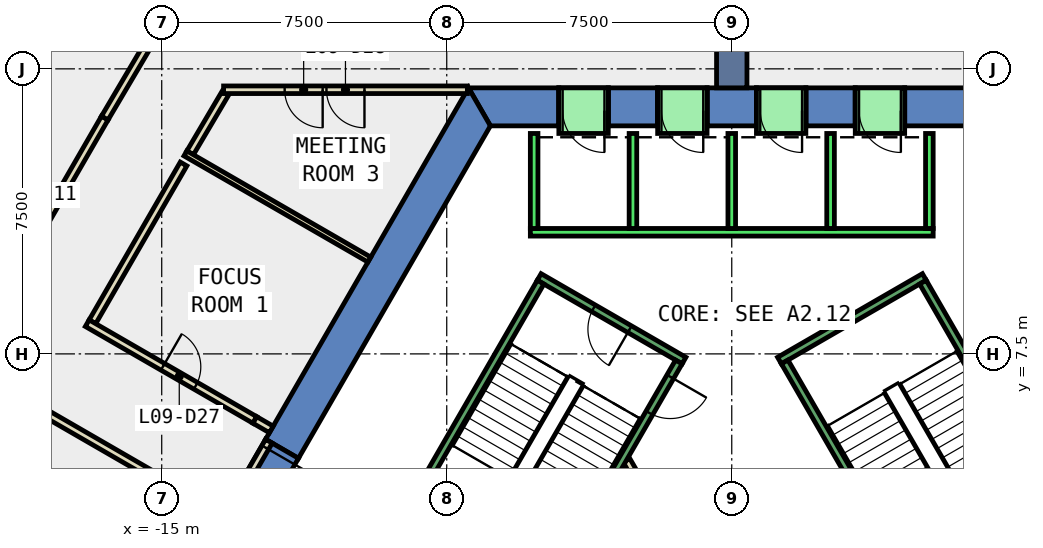
"""IFC4 building model, lengths in metres.
Left out: names, types, materials, properties, quantities, classifications, styles, units other than length and angle.
Written with IfcOpenShell. Run it as: python <this file> out.ifc"""

import sys

from ifc_helpers import new_model, si_unit, direction, frame, frame_2d, origin, place, context, subcontext, project, spatial, polyline, rectangle, outline, extrude, element, fill, save


model = new_model("IFC4")
c1 = context("Model", 3, precision=1e-05, world=origin(), true_north=direction((0.0, 1.0)))
c2 = subcontext(c1, "Body", "Model", "MODEL_VIEW")
j1 = project(units=[si_unit("LENGTHUNIT", "METRE"), si_unit("PLANEANGLEUNIT", "RADIAN")], contexts=[c1])
p1 = place(None, origin())
s1 = spatial("IfcSite", under=j1, at=p1, CompositionType="ELEMENT")
p2 = place(p1, origin())
s2 = spatial("IfcBuilding", under=s1, at=p2, CompositionType="ELEMENT")
p3 = place(p2, frame((0.0, 0.0, 47.6)))
s3 = spatial("IfcBuildingStorey", under=s2, at=p3, CompositionType="ELEMENT", Elevation=47.6)
p4 = place(p3, frame((0.0, 0.0, -0.4)))
e1 = element("IfcWall", 1, at=p4, inside=s3, PredefinedType="SHEAR", context=c2, shape_type="SweptSolid", body=[
    extrude(outline(polyline([(4.55, 14.5), (4.55, 13.5), (6.351, 13.5), (6.928, 14.5), (4.55, 14.5)])), origin(), (0.0, 0.0, 1.0), 4.2),
])
p5 = place(p3, frame((0.0, 0.0, -0.4)))
e2 = element("IfcWall", 2, at=p5, inside=s3, PredefinedType="SHEAR", context=c2, shape_type="SweptSolid", body=[
    extrude(outline(polyline([(1.95, 14.5), (1.95, 13.5), (3.25, 13.5), (3.25, 14.5), (1.95, 14.5)])), origin(), (0.0, 0.0, 1.0), 4.2),
])
p6 = place(p3, frame((0.0, 0.0, -0.4)))
e3 = element("IfcWall", 3, at=p6, inside=s3, PredefinedType="SHEAR", context=c2, shape_type="SweptSolid", body=[
    extrude(outline(polyline([(-0.65, 14.5), (-0.65, 13.5), (0.65, 13.5), (0.65, 14.5), (-0.65, 14.5)])), origin(), (0.0, 0.0, 1.0), 4.2),
])
p7 = place(p3, frame((0.0, 0.0, -0.4)))
e4 = element("IfcWall", 4, at=p7, inside=s3, PredefinedType="SHEAR", context=c2, shape_type="SweptSolid", body=[
    extrude(outline(polyline([(-3.25, 14.5), (-3.25, 13.5), (-1.95, 13.5), (-1.95, 14.5), (-3.25, 14.5)])), origin(), (0.0, 0.0, 1.0), 4.2),
])
p8 = place(p3, frame((0.0, 0.0, -0.4)))
e5 = element("IfcWall", 5, at=p8, inside=s3, PredefinedType="SHEAR", context=c2, shape_type="SweptSolid", body=[
    extrude(outline(polyline([(-4.55, 13.5), (-4.55, 14.5), (-6.928, 14.5), (-6.351, 13.5), (-4.55, 13.5)])), origin(), (0.0, 0.0, 1.0), 4.2),
])
p9 = place(p3, frame((0.0, 0.0, 3.6)))
e6 = element("IfcWall", 6, at=p9, inside=s3, PredefinedType="SHEAR", context=c2, shape_type="SweptSolid", body=[
    extrude(outline(polyline([(3.25, 14.5), (3.25, 13.5), (4.55, 13.5), (4.55, 14.5), (3.25, 14.5)])), origin(), (0.0, 0.0, 1.0), 0.2),
])
p10 = place(p3, frame((0.0, 0.0, 3.6)))
e7 = element("IfcWall", 7, at=p10, inside=s3, PredefinedType="SHEAR", context=c2, shape_type="SweptSolid", body=[
    extrude(outline(polyline([(0.65, 14.5), (0.65, 13.5), (1.95, 13.5), (1.95, 14.5), (0.65, 14.5)])), origin(), (0.0, 0.0, 1.0), 0.2),
])
p11 = place(p3, frame((0.0, 0.0, 3.6)))
e8 = element("IfcWall", 8, at=p11, inside=s3, PredefinedType="SHEAR", context=c2, shape_type="SweptSolid", body=[
    extrude(outline(polyline([(-1.95, 14.5), (-1.95, 13.5), (-0.65, 13.5), (-0.65, 14.5), (-1.95, 14.5)])), origin(), (0.0, 0.0, 1.0), 0.2),
])
p12 = place(p3, frame((0.0, 0.0, 3.6)))
e9 = element("IfcWall", 9, at=p12, inside=s3, PredefinedType="SHEAR", context=c2, shape_type="SweptSolid", body=[
    extrude(outline(polyline([(-4.55, 14.5), (-4.55, 13.5), (-3.25, 13.5), (-3.25, 14.5), (-4.55, 14.5)])), origin(), (0.0, 0.0, 1.0), 0.2),
])
p13 = place(p3, frame((0.0, 0.0, -0.4)))
e10 = element("IfcWall", 10, at=p13, inside=s3, PredefinedType="SHEAR", context=c2, shape_type="SweptSolid", body=[
    extrude(outline(polyline([(-12.267, 5.252), (-11.402, 4.752), (-6.351, 13.5), (-6.928, 14.5), (-12.267, 5.252)])), origin(), (0.0, 0.0, 1.0), 4.2),
])
p14 = place(p3, frame((0.0, 0.0, 3.6)))
e11 = element("IfcWall", 11, at=p14, inside=s3, PredefinedType="SHEAR", context=c2, shape_type="SweptSolid", body=[
    extrude(outline(polyline([(-13.267, 3.52), (-12.402, 3.02), (-11.402, 4.752), (-12.267, 5.252), (-13.267, 3.52)])), origin(), (0.0, 0.0, 1.0), 0.2),
])
p15 = place(p3, frame((0.0, 14.5, -0.4), z_axis=(0.0, 0.0, 1.0), x_axis=(0.0, 1.0, 0.0)))
e12 = element("IfcWall", 12, at=p15, inside=s3, PredefinedType="SHEAR", context=c2, shape_type="SweptSolid", body=[
    extrude(rectangle(XDim=9.0, YDim=0.8, at=frame_2d((4.5, 0.0))), origin(), (0.0, 0.0, 1.0), 4.2),
])
p16 = place(p3, frame((-14.425, 12.497, 0.0), z_axis=(0.0, 0.0, 1.0), x_axis=(-0.500026519606, -0.866010092142, 0.0)))
e13 = element("IfcWall", 13, at=p16, inside=s3, PredefinedType="PARTITIONING", context=c2, shape_type="SweptSolid", body=[
    extrude(rectangle(XDim=4.796, YDim=0.2, at=frame_2d((2.398, 0.0))), origin(), (0.0, 0.0, 1.0), 3.8),
])
p17 = place(p3, frame((-16.96, 8.308, 0.0), z_axis=(0.0, 0.0, 1.0), x_axis=(0.866018717003, -0.500011581666, 0.0)))
e14 = element("IfcWall", 14, at=p17, inside=s3, PredefinedType="PARTITIONING", context=c2, shape_type="SweptSolid", body=[
    extrude(rectangle(XDim=5.092, YDim=0.2, at=frame_2d((2.546, 0.0))), origin(), (0.0, 0.0, 1.0), 3.8),
])
p18 = place(p17, frame((2.296, 0.0, 0.0)))
e15 = element("IfcOpeningElement", 15, at=p18, cuts=e14, PredefinedType="OPENING", context=c2, shape_type="SweptSolid", body=[
    extrude(rectangle(XDim=1.0, YDim=2.1, at=frame_2d((0.5, 1.05))), frame((0.0, 0.11, 0.0), z_axis=(0.0, -1.0, 0.0), x_axis=(1.0, 0.0, 0.0)), (0.0, 0.0, 1.0), 0.22),
])
p19 = place(p3, frame((-13.323, 14.364, 0.0), z_axis=(0.0, 0.0, 1.0), x_axis=(-0.508274698505, -0.861195001646, 0.0)))
e16 = element("IfcWall", 16, at=p19, inside=s3, PredefinedType="PARTITIONING", context=c2, shape_type="SweptSolid", body=[
    extrude(rectangle(XDim=1.828, YDim=0.2, at=frame_2d((0.914, 0.0))), origin(), (0.0, 0.0, 1.0), 3.8),
])
p20 = place(p3, frame((-20.12, 7.434, 0.0), z_axis=(0.0, 0.0, 1.0), x_axis=(0.500039488902, 0.866002603656, 0.0)))
e17 = element("IfcWall", 17, at=p20, inside=s3, PredefinedType="PARTITIONING", context=c2, shape_type="SweptSolid", body=[
    extrude(rectangle(XDim=7.244, YDim=0.2, at=frame_2d((3.622, 0.0))), origin(), (0.0, 0.0, 1.0), 3.8),
])
p21 = place(p20, frame((3.122, 0.0, 0.0)))
e18 = element("IfcOpeningElement", 18, at=p21, cuts=e17, PredefinedType="OPENING", context=c2, shape_type="SweptSolid", body=[
    extrude(rectangle(XDim=1.0, YDim=2.1, at=frame_2d((0.5, 1.05))), frame((0.0, 0.11, 0.0), z_axis=(0.0, -1.0, 0.0), x_axis=(1.0, 0.0, 0.0)), (0.0, 0.0, 1.0), 0.22),
])
p22 = place(p3, frame((-16.498, 13.707, 0.0), z_axis=(0.0, 0.0, 1.0), x_axis=(0.508471945541, 0.861078556578, 0.0)))
e19 = element("IfcWall", 19, at=p22, inside=s3, PredefinedType="PARTITIONING", context=c2, shape_type="SweptSolid", body=[
    extrude(rectangle(XDim=3.548, YDim=0.2, at=frame_2d((1.774, 0.0))), origin(), (0.0, 0.0, 1.0), 3.8),
])
p23 = place(p3, frame((-14.377, 12.775, 0.0), z_axis=(0.0, 0.0, 1.0), x_axis=(0.866051730117, -0.499954398681, 0.0)))
e20 = element("IfcWall", 20, at=p23, inside=s3, PredefinedType="PARTITIONING", context=c2, shape_type="SweptSolid", body=[
    extrude(rectangle(XDim=5.588, YDim=0.15, at=frame_2d((2.794, 0.0))), origin(), (0.0, 0.0, 1.0), 3.8),
])
p24 = place(p3, frame((-6.957, 14.45, 0.0), z_axis=(0.0, 0.0, 1.0), x_axis=(-1.0, 0.0, 0.0)))
e21 = element("IfcWall", 21, at=p24, inside=s3, PredefinedType="PARTITIONING", context=c2, shape_type="SweptSolid", body=[
    extrude(rectangle(XDim=6.415, YDim=0.2, at=frame_2d((3.208, 0.0))), origin(), (0.0, 0.0, 1.0), 3.8),
])
p25 = place(p24, frame((2.708, 0.0, 0.0)))
e22 = element("IfcOpeningElement", 22, at=p25, cuts=e21, PredefinedType="OPENING", context=c2, shape_type="SweptSolid", body=[
    extrude(rectangle(XDim=1.0, YDim=2.1, at=frame_2d((0.5, 1.05))), frame((0.0, 0.11, 0.0), z_axis=(0.0, -1.0, 0.0), x_axis=(1.0, 0.0, 0.0)), (0.0, 0.0, 1.0), 0.22),
])
p26 = place(p24, frame((3.808, 0.0, 0.0)))
e23 = element("IfcOpeningElement", 23, at=p26, cuts=e21, PredefinedType="OPENING", context=c2, shape_type="SweptSolid", body=[
    extrude(rectangle(XDim=1.0, YDim=2.1, at=frame_2d((0.5, 1.05))), frame((0.0, 0.11, 0.0), z_axis=(0.0, -1.0, 0.0), x_axis=(1.0, 0.0, 0.0)), (0.0, 0.0, 1.0), 0.22),
])
p27 = place(p3, frame((-2.771, 4.7, 0.0), z_axis=(0.0, 0.0, 1.0), x_axis=(0.499969479948, -0.866043023828, 0.0)))
e24 = element("IfcWall", 24, at=p27, inside=s3, PredefinedType="PARTITIONING", context=c2, shape_type="SweptSolid", body=[
    extrude(rectangle(XDim=4.99, YDim=0.2, at=frame_2d((2.495, 0.0))), origin(), (0.0, 0.0, 1.0), 3.8),
])
p28 = place(p27, frame((1.945, 0.0, 0.0)))
e25 = element("IfcOpeningElement", 25, at=p28, cuts=e24, PredefinedType="OPENING", context=c2, shape_type="SweptSolid", body=[
    extrude(rectangle(XDim=1.0, YDim=2.1, at=frame_2d((0.5, 1.05))), frame((0.0, 0.11, 0.0), z_axis=(0.0, -1.0, 0.0), x_axis=(1.0, 0.0, 0.0)), (0.0, 0.0, 1.0), 0.22),
])
p29 = place(p3, frame((-12.18, 5.202, 0.0), z_axis=(0.0, 0.0, 1.0), x_axis=(-0.50002537861, -0.866010750942, 0.0)))
e26 = element("IfcWall", 26, at=p29, inside=s3, PredefinedType="PARTITIONING", context=c2, shape_type="SweptSolid", body=[
    extrude(rectangle(XDim=2.0, YDim=0.2, at=frame_2d((1.0, 0.0))), origin(), (0.0, 0.0, 1.0), 2.4),
])
p30 = place(p29, frame((0.19, 0.0, 0.0)))
e27 = element("IfcOpeningElement", 27, at=p30, cuts=e26, PredefinedType="OPENING", context=c2, shape_type="SweptSolid", body=[
    extrude(rectangle(XDim=1.8, YDim=2.1, at=frame_2d((0.9, 1.05))), frame((0.0, 0.11, 0.0), z_axis=(0.0, -1.0, 0.0), x_axis=(1.0, 0.0, 0.0)), (0.0, 0.0, 1.0), 0.22),
])
p31 = place(p3, frame((-12.55, 5.762, 0.0), z_axis=(0.0, 0.0, 1.0), x_axis=(0.866071776036, -0.499919672301, 0.0)))
e28 = element("IfcWall", 28, at=p31, inside=s3, PredefinedType="PARTITIONING", context=c2, shape_type="SweptSolid", body=[
    extrude(rectangle(XDim=0.5, YDim=0.2, at=frame_2d((0.25, 0.0))), origin(), (0.0, 0.0, 1.0), 2.4),
])
p32 = place(p3, frame((-13.85, 3.51, 0.0), z_axis=(0.0, 0.0, 1.0), x_axis=(-0.865969361037, 0.500097056325, 0.0)))
e29 = element("IfcWall", 29, at=p32, inside=s3, PredefinedType="PARTITIONING", context=c2, shape_type="SweptSolid", body=[
    extrude(rectangle(XDim=4.889, YDim=0.2, at=frame_2d((2.445, 0.0))), origin(), (0.0, 0.0, 1.0), 3.8),
])
p33 = place(p3, frame((5.3, 10.7, 0.0), z_axis=(0.0, 0.0, 1.0), x_axis=(-1.0, 0.0, 0.0)))
e30 = element("IfcWall", 30, at=p33, inside=s3, PredefinedType="STANDARD", context=c2, shape_type="SweptSolid", body=[
    extrude(rectangle(XDim=10.6, YDim=0.2, at=frame_2d((5.3, 0.0))), origin(), (0.0, 0.0, 1.0), 3.8),
])
for number, where, z_axis, x_axis in (
    (31, (5.2, 10.8, 0.0), (0.0, 0.0, 1.0), (0.0, 1.0, 0.0)),
    (32, (2.6, 10.8, 0.0), (0.0, 0.0, 1.0), (0.0, 1.0, 0.0)),
    (33, (0.0, 10.8, 0.0), (0.0, 0.0, 1.0), (0.0, 1.0, 0.0)),
    (34, (-2.6, 10.8, 0.0), (0.0, 0.0, 1.0), (0.0, 1.0, 0.0)),
    (35, (-5.2, 10.8, 0.0), (0.0, 0.0, 1.0), (0.0, 1.0, 0.0)),
):
    element("IfcWall", number, at=place(p3, frame(where, z_axis=z_axis, x_axis=x_axis)), inside=s3, PredefinedType="STANDARD", context=c2, shape_type="SweptSolid", body=[
        extrude(rectangle(XDim=2.5, YDim=0.2, at=frame_2d((1.25, 0.0))), origin(), (0.0, 0.0, 1.0), 3.8),
    ])
p34 = place(p3, frame((4.55, 13.9, 0.0), z_axis=(0.0, 0.0, 1.0), x_axis=(-1.0, 0.0, 0.0)))
e36 = element("IfcWall", 36, at=p34, inside=s3, PredefinedType="STANDARD", context=c2, shape_type="SweptSolid", body=[
    extrude(rectangle(XDim=1.3, YDim=1.2, at=frame_2d((0.65, 0.0))), origin(), (0.0, 0.0, 1.0), 2.4),
])
p35 = place(p34, frame((0.1, 0.0, 0.0)))
e37 = element("IfcOpeningElement", 37, at=p35, cuts=e36, PredefinedType="OPENING", context=c2, shape_type="SweptSolid", body=[
    extrude(rectangle(XDim=1.1, YDim=2.3, at=frame_2d((0.55, 1.15))), frame((0.0, 0.61, 0.0), z_axis=(0.0, -1.0, 0.0), x_axis=(1.0, 0.0, 0.0)), (0.0, 0.0, 1.0), 1.22),
])
p36 = place(p3, frame((1.95, 13.9, 0.0), z_axis=(0.0, 0.0, 1.0), x_axis=(-1.0, 0.0, 0.0)))
e38 = element("IfcWall", 38, at=p36, inside=s3, PredefinedType="STANDARD", context=c2, shape_type="SweptSolid", body=[
    extrude(rectangle(XDim=1.3, YDim=1.2, at=frame_2d((0.65, 0.0))), origin(), (0.0, 0.0, 1.0), 2.4),
])
p37 = place(p36, frame((0.1, 0.0, 0.0)))
e39 = element("IfcOpeningElement", 39, at=p37, cuts=e38, PredefinedType="OPENING", context=c2, shape_type="SweptSolid", body=[
    extrude(rectangle(XDim=1.1, YDim=2.3, at=frame_2d((0.55, 1.15))), frame((0.0, 0.61, 0.0), z_axis=(0.0, -1.0, 0.0), x_axis=(1.0, 0.0, 0.0)), (0.0, 0.0, 1.0), 1.22),
])
p38 = place(p3, frame((-0.65, 13.9, 0.0), z_axis=(0.0, 0.0, 1.0), x_axis=(-1.0, 0.0, 0.0)))
e40 = element("IfcWall", 40, at=p38, inside=s3, PredefinedType="STANDARD", context=c2, shape_type="SweptSolid", body=[
    extrude(rectangle(XDim=1.3, YDim=1.2, at=frame_2d((0.65, 0.0))), origin(), (0.0, 0.0, 1.0), 2.4),
])
p39 = place(p38, frame((0.1, 0.0, 0.0)))
e41 = element("IfcOpeningElement", 41, at=p39, cuts=e40, PredefinedType="OPENING", context=c2, shape_type="SweptSolid", body=[
    extrude(rectangle(XDim=1.1, YDim=2.3, at=frame_2d((0.55, 1.15))), frame((0.0, 0.61, 0.0), z_axis=(0.0, -1.0, 0.0), x_axis=(1.0, 0.0, 0.0)), (0.0, 0.0, 1.0), 1.22),
])
p40 = place(p3, frame((-3.25, 13.9, 0.0), z_axis=(0.0, 0.0, 1.0), x_axis=(-1.0, 0.0, 0.0)))
e42 = element("IfcWall", 42, at=p40, inside=s3, PredefinedType="STANDARD", context=c2, shape_type="SweptSolid", body=[
    extrude(rectangle(XDim=1.3, YDim=1.2, at=frame_2d((0.65, 0.0))), origin(), (0.0, 0.0, 1.0), 2.4),
])
p41 = place(p40, frame((0.1, 0.0, 0.0)))
e43 = element("IfcOpeningElement", 43, at=p41, cuts=e42, PredefinedType="OPENING", context=c2, shape_type="SweptSolid", body=[
    extrude(rectangle(XDim=1.1, YDim=2.3, at=frame_2d((0.55, 1.15))), frame((0.0, 0.61, 0.0), z_axis=(0.0, -1.0, 0.0), x_axis=(1.0, 0.0, 0.0)), (0.0, 0.0, 1.0), 1.22),
])
p42 = place(p3, frame((1.256, 7.324, 0.0), z_axis=(0.0, 0.0, 1.0), x_axis=(0.866046073146, 0.499964197906, 0.0)))
e44 = element("IfcWall", 44, at=p42, inside=s3, PredefinedType="STANDARD", context=c2, shape_type="SweptSolid", body=[
    extrude(rectangle(XDim=4.4, YDim=0.2, at=frame_2d((2.2, 0.0))), origin(), (0.0, 0.0, 1.0), 3.8),
])
p43 = place(p3, frame((4.843, 1.312, 0.0), z_axis=(0.0, 0.0, 1.0), x_axis=(-0.499963383562, 0.866046543262, 0.0)))
e45 = element("IfcWall", 45, at=p43, inside=s3, PredefinedType="STANDARD", context=c2, shape_type="SweptSolid", body=[
    extrude(rectangle(XDim=6.9, YDim=0.2, at=frame_2d((3.45, 0.0))), origin(), (0.0, 0.0, 1.0), 3.8),
])
p44 = place(p43, frame((0.45, 0.0, 0.0)))
e46 = element("IfcOpeningElement", 46, at=p44, cuts=e45, PredefinedType="OPENING", context=c2, shape_type="SweptSolid", body=[
    extrude(rectangle(XDim=1.1, YDim=2.2, at=frame_2d((0.55, 1.1))), frame((0.0, 0.11, 0.0), z_axis=(0.0, -1.0, 0.0), x_axis=(1.0, 0.0, 0.0)), (0.0, 0.0, 1.0), 0.22),
])
p45 = place(p3, frame((8.48, 3.412, 0.0), z_axis=(0.0, 0.0, 1.0), x_axis=(-0.499978703459, 0.866037698999, 0.0)))
e47 = element("IfcWall", 47, at=p45, inside=s3, PredefinedType="STANDARD", context=c2, shape_type="SweptSolid", body=[
    extrude(rectangle(XDim=6.9, YDim=0.2, at=frame_2d((3.45, 0.0))), origin(), (0.0, 0.0, 1.0), 3.8),
])
p46 = place(p3, frame((-1.256, 7.324, 0.0), z_axis=(0.0, 0.0, 1.0), x_axis=(-0.866046073146, 0.499964197906, 0.0)))
e48 = element("IfcWall", 48, at=p46, inside=s3, PredefinedType="STANDARD", context=c2, shape_type="SweptSolid", body=[
    extrude(rectangle(XDim=4.4, YDim=0.2, at=frame_2d((2.2, 0.0))), origin(), (0.0, 0.0, 1.0), 3.8),
])
p47 = place(p46, frame((1.65, 0.0, 0.0)))
e49 = element("IfcOpeningElement", 49, at=p47, cuts=e48, PredefinedType="OPENING", context=c2, shape_type="SweptSolid", body=[
    extrude(rectangle(XDim=1.1, YDim=2.2, at=frame_2d((0.55, 1.1))), frame((0.0, 0.11, 0.0), z_axis=(0.0, -1.0, 0.0), x_axis=(1.0, 0.0, 0.0)), (0.0, 0.0, 1.0), 0.22),
])
p48 = place(p3, frame((-1.393, 7.288, 0.0), z_axis=(0.0, 0.0, 1.0), x_axis=(-0.499963383562, -0.866046543262, 0.0)))
e50 = element("IfcWall", 50, at=p48, inside=s3, PredefinedType="STANDARD", context=c2, shape_type="SweptSolid", body=[
    extrude(rectangle(XDim=6.9, YDim=0.2, at=frame_2d((3.45, 0.0))), origin(), (0.0, 0.0, 1.0), 3.8),
])
p49 = place(p48, frame((0.45, 0.0, 0.0)))
e51 = element("IfcOpeningElement", 51, at=p49, cuts=e50, PredefinedType="OPENING", context=c2, shape_type="SweptSolid", body=[
    extrude(rectangle(XDim=1.1, YDim=2.2, at=frame_2d((0.55, 1.1))), frame((0.0, 0.11, 0.0), z_axis=(0.0, -1.0, 0.0), x_axis=(1.0, 0.0, 0.0)), (0.0, 0.0, 1.0), 0.22),
])
p50 = place(p3, frame((-5.03, 9.388, 0.0), z_axis=(0.0, 0.0, 1.0), x_axis=(-0.499978703459, -0.866037698999, 0.0)))
e52 = element("IfcWall", 52, at=p50, inside=s3, PredefinedType="STANDARD", context=c2, shape_type="SweptSolid", body=[
    extrude(rectangle(XDim=6.9, YDim=0.2, at=frame_2d((3.45, 0.0))), origin(), (0.0, 0.0, 1.0), 3.8),
])
p51 = place(p18, origin())
e53 = element("IfcDoor", 53, at=p51, inside=s3, OperationType="SINGLE_SWING_LEFT", PredefinedType="DOOR", context=c2, shape_type="SweptSolid", body=[
    extrude(rectangle(XDim=1.0, YDim=2.1, at=frame_2d((0.5, 1.05))), frame((0.0, 0.025, 0.0), z_axis=(0.0, -1.0, 0.0), x_axis=(1.0, 0.0, 0.0)), (0.0, 0.0, 1.0), 0.05),
])
fill(e15, e53)
p52 = place(p25, origin())
e54 = element("IfcDoor", 54, at=p52, inside=s3, OperationType="SINGLE_SWING_LEFT", PredefinedType="DOOR", context=c2, shape_type="SweptSolid", body=[
    extrude(rectangle(XDim=1.0, YDim=2.1, at=frame_2d((0.5, 1.05))), frame((0.0, 0.025, 0.0), z_axis=(0.0, -1.0, 0.0), x_axis=(1.0, 0.0, 0.0)), (0.0, 0.0, 1.0), 0.05),
])
fill(e22, e54)
p53 = place(p26, origin())
e55 = element("IfcDoor", 55, at=p53, inside=s3, OperationType="SINGLE_SWING_RIGHT", PredefinedType="DOOR", context=c2, shape_type="SweptSolid", body=[
    extrude(rectangle(XDim=1.0, YDim=2.1, at=frame_2d((0.5, 1.05))), frame((0.0, 0.025, 0.0), z_axis=(0.0, -1.0, 0.0), x_axis=(1.0, 0.0, 0.0)), (0.0, 0.0, 1.0), 0.05),
])
fill(e23, e55)
p54 = place(p30, origin())
e56 = element("IfcDoor", 56, at=p54, inside=s3, OperationType="DOUBLE_DOOR_SINGLE_SWING", PredefinedType="DOOR", context=c2, shape_type="SweptSolid", body=[
    extrude(rectangle(XDim=1.8, YDim=2.1, at=frame_2d((0.9, 1.05))), frame((0.0, 0.025, 0.0), z_axis=(0.0, -1.0, 0.0), x_axis=(1.0, 0.0, 0.0)), (0.0, 0.0, 1.0), 0.05),
])
fill(e27, e56)
p55 = place(p35, origin())
e57 = element("IfcDoor", 57, at=p55, inside=s3, OperationType="SLIDING_TO_LEFT", PredefinedType="DOOR", context=c2, shape_type="SweptSolid", body=[
    extrude(rectangle(XDim=1.1, YDim=2.3, at=frame_2d((0.55, 1.15))), frame((0.0, 0.025, 0.0), z_axis=(0.0, -1.0, 0.0), x_axis=(1.0, 0.0, 0.0)), (0.0, 0.0, 1.0), 0.05),
])
fill(e37, e57)
p56 = place(p37, origin())
e58 = element("IfcDoor", 58, at=p56, inside=s3, OperationType="SLIDING_TO_LEFT", PredefinedType="DOOR", context=c2, shape_type="SweptSolid", body=[
    extrude(rectangle(XDim=1.1, YDim=2.3, at=frame_2d((0.55, 1.15))), frame((0.0, 0.025, 0.0), z_axis=(0.0, -1.0, 0.0), x_axis=(1.0, 0.0, 0.0)), (0.0, 0.0, 1.0), 0.05),
])
fill(e39, e58)
p57 = place(p39, origin())
e59 = element("IfcDoor", 59, at=p57, inside=s3, OperationType="SLIDING_TO_LEFT", PredefinedType="DOOR", context=c2, shape_type="SweptSolid", body=[
    extrude(rectangle(XDim=1.1, YDim=2.3, at=frame_2d((0.55, 1.15))), frame((0.0, 0.025, 0.0), z_axis=(0.0, -1.0, 0.0), x_axis=(1.0, 0.0, 0.0)), (0.0, 0.0, 1.0), 0.05),
])
fill(e41, e59)
p58 = place(p41, origin())
e60 = element("IfcDoor", 60, at=p58, inside=s3, OperationType="SLIDING_TO_LEFT", PredefinedType="DOOR", context=c2, shape_type="SweptSolid", body=[
    extrude(rectangle(XDim=1.1, YDim=2.3, at=frame_2d((0.55, 1.15))), frame((0.0, 0.025, 0.0), z_axis=(0.0, -1.0, 0.0), x_axis=(1.0, 0.0, 0.0)), (0.0, 0.0, 1.0), 0.05),
])
fill(e43, e60)
p59 = place(p49, origin())
e61 = element("IfcDoor", 61, at=p59, inside=s3, OperationType="SINGLE_SWING_LEFT", PredefinedType="DOOR", context=c2, shape_type="SweptSolid", body=[
    extrude(rectangle(XDim=1.1, YDim=2.2, at=frame_2d((0.55, 1.1))), frame((0.0, 0.025, 0.0), z_axis=(0.0, -1.0, 0.0), x_axis=(1.0, 0.0, 0.0)), (0.0, 0.0, 1.0), 0.05),
])
fill(e51, e61)
p60 = place(p47, origin())
e62 = element("IfcDoor", 62, at=p60, inside=s3, OperationType="SINGLE_SWING_LEFT", PredefinedType="DOOR", context=c2, shape_type="SweptSolid", body=[
    extrude(rectangle(XDim=1.1, YDim=2.2, at=frame_2d((0.55, 1.1))), frame((0.0, 0.025, 0.0), z_axis=(0.0, -1.0, 0.0), x_axis=(1.0, 0.0, 0.0)), (0.0, 0.0, 1.0), 0.05),
])
fill(e49, e62)
save(model, sys.argv[1])
